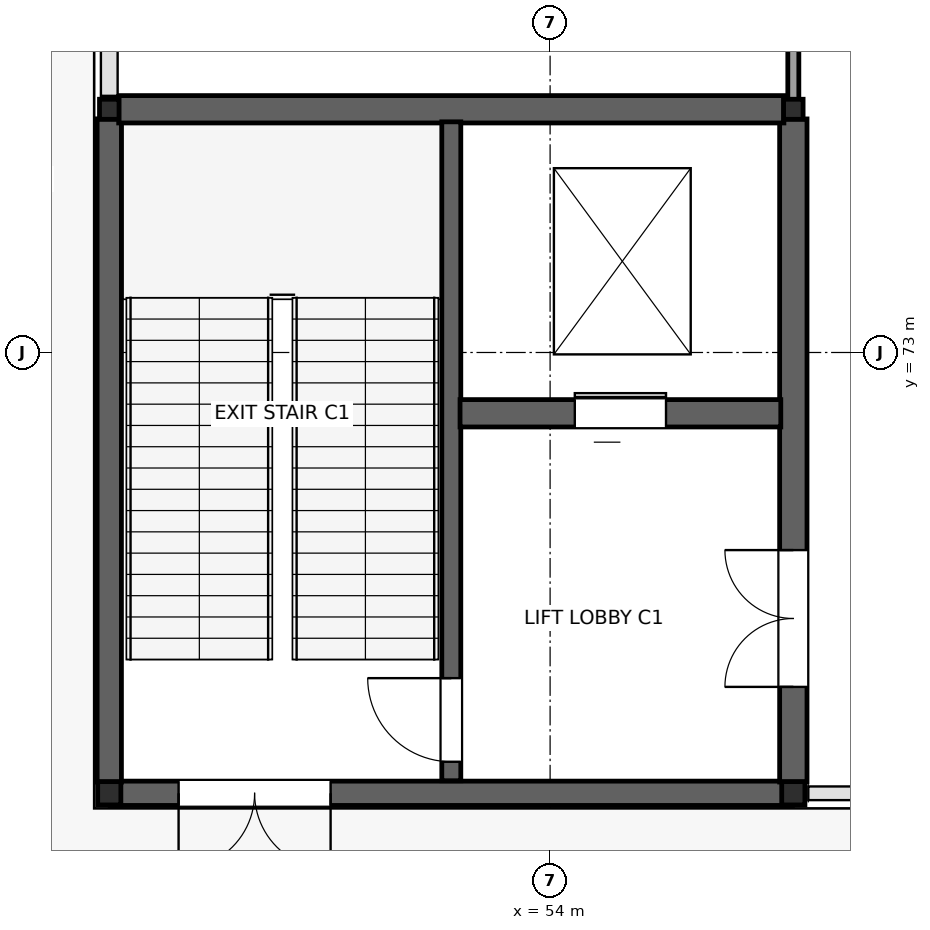
"""IFC4 building model, lengths in metres.
Left out: names, types, materials, properties, quantities, classifications, styles, units other than length and angle.
Written with IfcOpenShell. Run it as: python <this file> out.ifc"""

import sys

from ifc_helpers import new_model, si_unit, direction, frame, frame_2d, origin, origin_2d, place, context, subcontext, project, spatial, rectangle, i_section, extrude, element, fill, save


model = new_model("IFC4")
c1 = context("Model", 3, precision=1e-05, world=origin(), true_north=direction((0.0, 1.0)))
c2 = subcontext(c1, "Body", "Model", "MODEL_VIEW")
j1 = project(units=[si_unit("LENGTHUNIT", "METRE"), si_unit("PLANEANGLEUNIT", "RADIAN")], contexts=[c1])
p1 = place(None, origin())
s1 = spatial("IfcSite", under=j1, at=p1, CompositionType="ELEMENT")
p2 = place(p1, origin())
s2 = spatial("IfcBuilding", under=s1, at=p2, CompositionType="ELEMENT")
p3 = place(p2, origin())
s3 = spatial("IfcBuildingStorey", under=s2, at=p3, CompositionType="ELEMENT", Elevation=0.0)
for number, where, z_axis, x_axis in (
    (1, (48.2, 67.2, 0.0), (0.0, 0.0, 1.0), (1.0, 0.0, 0.0)),
    (2, (57.2, 67.2, 0.0), (0.0, 0.0, 1.0), (1.0, 0.0, 0.0)),
):
    element("IfcColumn", number, at=place(p3, frame(where, z_axis=z_axis, x_axis=x_axis)), inside=s3, PredefinedType="COLUMN", context=c2, shape_type="SweptSolid", body=[
        extrude(i_section(OverallWidth=0.305, OverallDepth=0.307, WebThickness=0.01, FlangeThickness=0.015, at=origin_2d()), origin(), (0.0, 0.0, 1.0), 6.0),
    ])
for number, where, z_axis, x_axis in (
    (3, (48.2, 76.2, 0.0), (0.0, 0.0, 1.0), (1.0, 0.0, 0.0)),
    (4, (57.2, 76.2, 0.0), (0.0, 0.0, 1.0), (1.0, 0.0, 0.0)),
):
    element("IfcColumn", number, at=place(p3, frame(where, z_axis=z_axis, x_axis=x_axis)), inside=s3, PredefinedType="COLUMN", context=c2, shape_type="SweptSolid", body=[
        extrude(i_section(OverallWidth=0.257, OverallDepth=0.264, WebThickness=0.012, FlangeThickness=0.02, at=origin_2d()), origin(), (0.0, 0.0, 1.0), 6.0),
    ])
p4 = place(p3, frame((57.188, 67.2, 0.0), z_axis=(0.0, 0.0, 1.0), x_axis=(-1.0, 0.0, 0.0)))
e5 = element("IfcWall", 5, at=p4, inside=s3, PredefinedType="STANDARD", context=c2, shape_type="SweptSolid", body=[
    extrude(rectangle(XDim=8.976, YDim=0.32, at=frame_2d((4.488, 0.0))), origin(), (0.0, 0.0, 1.0), 5.78),
])
p5 = place(p4, frame((6.076, 0.0, 0.0)))
e6 = element("IfcOpeningElement", 6, at=p5, cuts=e5, PredefinedType="OPENING", context=c2, shape_type="SweptSolid", body=[
    extrude(rectangle(XDim=2.0, YDim=2.4, at=frame_2d((1.0, 1.2))), frame((0.0, 0.17, 0.0), z_axis=(0.0, -1.0, 0.0), x_axis=(1.0, 0.0, 0.0)), (0.0, 0.0, 1.0), 0.34),
])
p6 = place(p3, frame((48.2, 67.347, 0.0), z_axis=(0.0, 0.0, 1.0), x_axis=(0.0, 1.0, 0.0)))
e7 = element("IfcWall", 7, at=p6, inside=s3, PredefinedType="STANDARD", context=c2, shape_type="SweptSolid", body=[
    extrude(rectangle(XDim=8.727, YDim=0.32, at=frame_2d((4.364, 0.0))), origin(), (0.0, 0.0, 1.0), 5.78),
])
p7 = place(p3, frame((57.2, 67.348, 0.0), z_axis=(0.0, 0.0, 1.0), x_axis=(0.0, 1.0, 0.0)))
e8 = element("IfcWall", 8, at=p7, inside=s3, PredefinedType="SHEAR", context=c2, shape_type="SweptSolid", body=[
    extrude(rectangle(XDim=8.725, YDim=0.36, at=frame_2d((4.363, 0.0))), origin(), (0.0, 0.0, 1.0), 5.78),
])
p8 = place(p7, frame((1.252, 0.0, 0.0)))
e9 = element("IfcOpeningElement", 9, at=p8, cuts=e8, PredefinedType="OPENING", context=c2, shape_type="SweptSolid", body=[
    extrude(rectangle(XDim=1.8, YDim=2.3, at=frame_2d((0.9, 1.15))), frame((0.0, 0.19, 0.0), z_axis=(0.0, -1.0, 0.0), x_axis=(1.0, 0.0, 0.0)), (0.0, 0.0, 1.0), 0.38),
])
p9 = place(p3, frame((48.324, 76.2, 0.0), z_axis=(0.0, 0.0, 1.0), x_axis=(1.0, 0.0, 0.0)))
e10 = element("IfcWall", 10, at=p9, inside=s3, PredefinedType="SHEAR", context=c2, shape_type="SweptSolid", body=[
    extrude(rectangle(XDim=8.752, YDim=0.36, at=frame_2d((4.376, 0.0))), origin(), (0.0, 0.0, 1.0), 5.78),
])
p10 = place(p3, frame((52.7, 67.365, 0.0), z_axis=(0.0, 0.0, 1.0), x_axis=(0.0, 1.0, 0.0)))
e11 = element("IfcWall", 11, at=p10, inside=s3, PredefinedType="SHEAR", context=c2, shape_type="SweptSolid", body=[
    extrude(rectangle(XDim=8.67, YDim=0.25, at=frame_2d((4.335, 0.0))), origin(), (0.0, 0.0, 1.0), 5.78),
])
p11 = place(p10, frame((0.25, 0.0, 0.0)))
e12 = element("IfcOpeningElement", 12, at=p11, cuts=e11, PredefinedType="OPENING", context=c2, shape_type="SweptSolid", body=[
    extrude(rectangle(XDim=1.1, YDim=2.2, at=frame_2d((0.55, 1.1))), frame((0.0, 0.135, 0.0), z_axis=(0.0, -1.0, 0.0), x_axis=(1.0, 0.0, 0.0)), (0.0, 0.0, 1.0), 0.27),
])
p12 = place(p3, frame((52.815, 72.2, 0.0), z_axis=(0.0, 0.0, 1.0), x_axis=(1.0, 0.0, 0.0)))
e13 = element("IfcWall", 13, at=p12, inside=s3, PredefinedType="SHEAR", context=c2, shape_type="SweptSolid", body=[
    extrude(rectangle(XDim=4.22, YDim=0.36, at=frame_2d((2.11, 0.0))), origin(), (0.0, 0.0, 1.0), 5.78),
])
p13 = place(p12, frame((1.51, 0.0, 0.0)))
e14 = element("IfcOpeningElement", 14, at=p13, cuts=e13, PredefinedType="OPENING", context=c2, shape_type="SweptSolid", body=[
    extrude(rectangle(XDim=1.2, YDim=2.3, at=frame_2d((0.6, 1.15))), frame((0.0, 0.19, 0.0), z_axis=(0.0, -1.0, 0.0), x_axis=(1.0, 0.0, 0.0)), (0.0, 0.0, 1.0), 0.38),
])
p14 = place(p3, frame((57.2, 76.327, 0.0), z_axis=(0.0, 0.0, 1.0), x_axis=(0.0, 1.0, 0.0)))
e15 = element("IfcWall", 15, at=p14, inside=s3, PredefinedType="PARTITIONING", context=c2, shape_type="SweptSolid", body=[
    extrude(rectangle(XDim=8.546, YDim=0.145, at=frame_2d((4.273, 0.0))), origin(), (0.0, 0.0, 1.0), 5.2),
])
p15 = place(p14, frame((3.2, 0.0, 0.0)))
e16 = element("IfcOpeningElement", 16, at=p15, cuts=e15, PredefinedType="OPENING", context=c2, shape_type="SweptSolid", body=[
    extrude(rectangle(XDim=1.65, YDim=2.25, at=frame_2d((0.825, 1.125))), frame((0.0, 0.083, 0.0), z_axis=(0.0, -1.0, 0.0), x_axis=(1.0, 0.0, 0.0)), (0.0, 0.0, 1.0), 0.165),
])
p16 = place(p5, origin())
e17 = element("IfcDoor", 17, at=p16, inside=s3, OperationType="DOUBLE_DOOR_SINGLE_SWING", PredefinedType="DOOR", context=c2, shape_type="SweptSolid", body=[
    extrude(rectangle(XDim=2.0, YDim=2.4, at=frame_2d((1.0, 1.2))), frame((0.0, 0.025, 0.0), z_axis=(0.0, -1.0, 0.0), x_axis=(1.0, 0.0, 0.0)), (0.0, 0.0, 1.0), 0.05),
])
fill(e6, e17)
p17 = place(p11, origin())
e18 = element("IfcDoor", 18, at=p17, inside=s3, OperationType="SINGLE_SWING_RIGHT", PredefinedType="DOOR", context=c2, shape_type="SweptSolid", body=[
    extrude(rectangle(XDim=1.1, YDim=2.2, at=frame_2d((0.55, 1.1))), frame((0.0, 0.025, 0.0), z_axis=(0.0, -1.0, 0.0), x_axis=(1.0, 0.0, 0.0)), (0.0, 0.0, 1.0), 0.05),
])
fill(e12, e18)
p18 = place(p13, origin())
e19 = element("IfcDoor", 19, at=p18, inside=s3, OperationType="SLIDING_TO_LEFT", PredefinedType="DOOR", context=c2, shape_type="SweptSolid", body=[
    extrude(rectangle(XDim=1.2, YDim=2.3, at=frame_2d((0.6, 1.15))), frame((0.0, 0.025, 0.0), z_axis=(0.0, -1.0, 0.0), x_axis=(1.0, 0.0, 0.0)), (0.0, 0.0, 1.0), 0.05),
])
fill(e14, e19)
p19 = place(p8, origin())
e20 = element("IfcDoor", 20, at=p19, inside=s3, OperationType="DOUBLE_DOOR_SINGLE_SWING", PredefinedType="DOOR", context=c2, shape_type="SweptSolid", body=[
    extrude(rectangle(XDim=1.8, YDim=2.3, at=frame_2d((0.9, 1.15))), frame((0.0, 0.025, 0.0), z_axis=(0.0, -1.0, 0.0), x_axis=(1.0, 0.0, 0.0)), (0.0, 0.0, 1.0), 0.05),
])
fill(e9, e20)
save(model, sys.argv[1])
